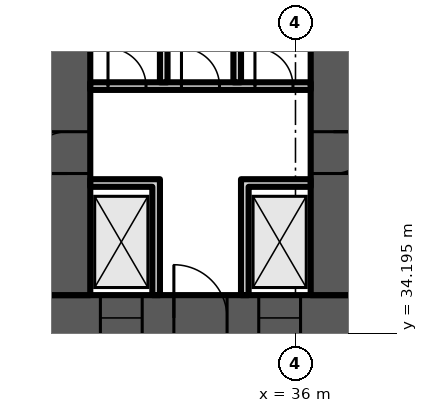
"""IFC4 building model, lengths in metres.
Left out: names, types, materials, properties, quantities, classifications, styles, units other than length and angle.
Written with IfcOpenShell. Run it as: python <this file> out.ifc"""

import sys

from ifc_helpers import new_model, si_unit, direction, frame, frame_2d, origin, place, context, subcontext, project, spatial, polyline, rectangle, outline, extrude, element, fill, save


model = new_model("IFC4")
c1 = context("Model", 3, precision=1e-05, world=origin(), true_north=direction((0.0, 1.0)))
c2 = subcontext(c1, "Body", "Model", "MODEL_VIEW")
j1 = project(units=[si_unit("LENGTHUNIT", "METRE"), si_unit("PLANEANGLEUNIT", "RADIAN")], contexts=[c1])
p1 = place(None, origin())
s1 = spatial("IfcSite", under=j1, at=p1, CompositionType="ELEMENT")
p2 = place(p1, origin())
s2 = spatial("IfcBuilding", under=s1, at=p2, CompositionType="ELEMENT")
p3 = place(p2, frame((0.0, 0.0, 84.7)))
s3 = spatial("IfcBuildingStorey", under=s2, at=p3, CompositionType="ELEMENT", Elevation=84.7)
p4 = place(p3, frame((9.0, 34.6, 0.0), z_axis=(0.0, 0.0, 1.0), x_axis=(1.0, 0.0, 0.0)))
e1 = element("IfcWall", 1, at=p4, inside=s3, PredefinedType="SHEAR", context=c2, shape_type="SweptSolid", body=[
    extrude(rectangle(XDim=56.0, YDim=1.2, at=frame_2d((28.0, 0.0))), origin(), (0.0, 0.0, 1.0), 3.6),
])
p5 = place(p4, frame((3.3, 0.0, 0.0)))
e2 = element("IfcOpeningElement", 2, at=p5, cuts=e1, PredefinedType="OPENING", context=c2, shape_type="SweptSolid", body=[
    extrude(rectangle(XDim=1.0, YDim=2.1, at=frame_2d((0.5, 1.05))), frame((0.0, 0.61, 0.0), z_axis=(0.0, -1.0, 0.0), x_axis=(1.0, 0.0, 0.0)), (0.0, 0.0, 1.0), 1.22),
])
p6 = place(p4, frame((7.867, 0.0, 0.0)))
e3 = element("IfcOpeningElement", 3, at=p6, cuts=e1, PredefinedType="OPENING", context=c2, shape_type="SweptSolid", body=[
    extrude(rectangle(XDim=1.1, YDim=2.1, at=frame_2d((0.55, 1.05))), frame((0.0, 0.61, 0.0), z_axis=(0.0, -1.0, 0.0), x_axis=(1.0, 0.0, 0.0)), (0.0, 0.0, 1.0), 1.22),
])
p7 = place(p4, frame((12.033, 0.0, 0.0)))
e4 = element("IfcOpeningElement", 4, at=p7, cuts=e1, PredefinedType="OPENING", context=c2, shape_type="SweptSolid", body=[
    extrude(rectangle(XDim=1.1, YDim=2.1, at=frame_2d((0.55, 1.05))), frame((0.0, 0.61, 0.0), z_axis=(0.0, -1.0, 0.0), x_axis=(1.0, 0.0, 0.0)), (0.0, 0.0, 1.0), 1.22),
])
p8 = place(p4, frame((9.8, 0.0, 0.0)))
e5 = element("IfcOpeningElement", 5, at=p8, cuts=e1, PredefinedType="OPENING", context=c2, shape_type="SweptSolid", body=[
    extrude(rectangle(XDim=1.4, YDim=2.1, at=frame_2d((0.7, 1.05))), frame((0.0, 0.61, 0.0), z_axis=(0.0, -1.0, 0.0), x_axis=(1.0, 0.0, 0.0)), (0.0, 0.0, 1.0), 1.22),
])
p9 = place(p4, frame((14.65, 0.0, 0.0)))
e6 = element("IfcOpeningElement", 6, at=p9, cuts=e1, PredefinedType="OPENING", context=c2, shape_type="SweptSolid", body=[
    extrude(rectangle(XDim=1.2, YDim=2.1, at=frame_2d((0.6, 1.05))), frame((0.0, 0.61, 0.0), z_axis=(0.0, -1.0, 0.0), x_axis=(1.0, 0.0, 0.0)), (0.0, 0.0, 1.0), 1.22),
])
p10 = place(p4, frame((21.867, 0.0, 0.0)))
e7 = element("IfcOpeningElement", 7, at=p10, cuts=e1, PredefinedType="OPENING", context=c2, shape_type="SweptSolid", body=[
    extrude(rectangle(XDim=1.1, YDim=2.1, at=frame_2d((0.55, 1.05))), frame((0.0, 0.61, 0.0), z_axis=(0.0, -1.0, 0.0), x_axis=(1.0, 0.0, 0.0)), (0.0, 0.0, 1.0), 1.22),
])
p11 = place(p4, frame((26.033, 0.0, 0.0)))
e8 = element("IfcOpeningElement", 8, at=p11, cuts=e1, PredefinedType="OPENING", context=c2, shape_type="SweptSolid", body=[
    extrude(rectangle(XDim=1.1, YDim=2.1, at=frame_2d((0.55, 1.05))), frame((0.0, 0.61, 0.0), z_axis=(0.0, -1.0, 0.0), x_axis=(1.0, 0.0, 0.0)), (0.0, 0.0, 1.0), 1.22),
])
p12 = place(p4, frame((23.8, 0.0, 0.0)))
e9 = element("IfcOpeningElement", 9, at=p12, cuts=e1, PredefinedType="OPENING", context=c2, shape_type="SweptSolid", body=[
    extrude(rectangle(XDim=1.4, YDim=2.1, at=frame_2d((0.7, 1.05))), frame((0.0, 0.61, 0.0), z_axis=(0.0, -1.0, 0.0), x_axis=(1.0, 0.0, 0.0)), (0.0, 0.0, 1.0), 1.22),
])
p13 = place(p4, frame((28.867, 0.0, 0.0)))
e10 = element("IfcOpeningElement", 10, at=p13, cuts=e1, PredefinedType="OPENING", context=c2, shape_type="SweptSolid", body=[
    extrude(rectangle(XDim=1.1, YDim=2.1, at=frame_2d((0.55, 1.05))), frame((0.0, 0.61, 0.0), z_axis=(0.0, -1.0, 0.0), x_axis=(1.0, 0.0, 0.0)), (0.0, 0.0, 1.0), 1.22),
])
p14 = place(p4, frame((33.033, 0.0, 0.0)))
e11 = element("IfcOpeningElement", 11, at=p14, cuts=e1, PredefinedType="OPENING", context=c2, shape_type="SweptSolid", body=[
    extrude(rectangle(XDim=1.1, YDim=2.1, at=frame_2d((0.55, 1.05))), frame((0.0, 0.61, 0.0), z_axis=(0.0, -1.0, 0.0), x_axis=(1.0, 0.0, 0.0)), (0.0, 0.0, 1.0), 1.22),
])
p15 = place(p4, frame((40.15, 0.0, 0.0)))
e12 = element("IfcOpeningElement", 12, at=p15, cuts=e1, PredefinedType="OPENING", context=c2, shape_type="SweptSolid", body=[
    extrude(rectangle(XDim=1.2, YDim=2.1, at=frame_2d((0.6, 1.05))), frame((0.0, 0.61, 0.0), z_axis=(0.0, -1.0, 0.0), x_axis=(1.0, 0.0, 0.0)), (0.0, 0.0, 1.0), 1.22),
])
p16 = place(p4, frame((44.8, 0.0, 0.0)))
e13 = element("IfcOpeningElement", 13, at=p16, cuts=e1, PredefinedType="OPENING", context=c2, shape_type="SweptSolid", body=[
    extrude(rectangle(XDim=1.4, YDim=2.1, at=frame_2d((0.7, 1.05))), frame((0.0, 0.61, 0.0), z_axis=(0.0, -1.0, 0.0), x_axis=(1.0, 0.0, 0.0)), (0.0, 0.0, 1.0), 1.22),
])
p17 = place(p4, frame((49.867, 0.0, 0.0)))
e14 = element("IfcOpeningElement", 14, at=p17, cuts=e1, PredefinedType="OPENING", context=c2, shape_type="SweptSolid", body=[
    extrude(rectangle(XDim=1.1, YDim=2.1, at=frame_2d((0.55, 1.05))), frame((0.0, 0.61, 0.0), z_axis=(0.0, -1.0, 0.0), x_axis=(1.0, 0.0, 0.0)), (0.0, 0.0, 1.0), 1.22),
])
p18 = place(p4, frame((53.5, 0.0, 0.0)))
e15 = element("IfcOpeningElement", 15, at=p18, cuts=e1, PredefinedType="OPENING", context=c2, shape_type="SweptSolid", body=[
    extrude(rectangle(XDim=1.1, YDim=2.1, at=frame_2d((0.55, 1.05))), frame((0.0, 0.61, 0.0), z_axis=(0.0, -1.0, 0.0), x_axis=(1.0, 0.0, 0.0)), (0.0, 0.0, 1.0), 1.22),
])
p19 = place(p4, frame((51.567, 0.0, 0.0)))
e16 = element("IfcOpeningElement", 16, at=p19, cuts=e1, PredefinedType="OPENING", context=c2, shape_type="SweptSolid", body=[
    extrude(rectangle(XDim=1.4, YDim=2.1, at=frame_2d((0.7, 1.05))), frame((0.0, 0.61, 0.0), z_axis=(0.0, -1.0, 0.0), x_axis=(1.0, 0.0, 0.0)), (0.0, 0.0, 1.0), 1.22),
])
p20 = place(p3, frame((30.0, 35.2, 0.0), z_axis=(0.0, 0.0, 1.0), x_axis=(0.0, 1.0, 0.0)))
e17 = element("IfcWall", 17, at=p20, inside=s3, PredefinedType="SHEAR", context=c2, shape_type="SweptSolid", body=[
    extrude(rectangle(XDim=14.168, YDim=1.2, at=frame_2d((7.084, 0.0))), origin(), (0.0, 0.0, 1.0), 3.6),
])
p21 = place(p20, frame((3.2, 0.0, 0.0)))
e18 = element("IfcOpeningElement", 18, at=p21, cuts=e17, PredefinedType="OPENING", context=c2, shape_type="SweptSolid", body=[
    extrude(rectangle(XDim=1.1, YDim=2.1, at=frame_2d((0.55, 1.05))), frame((0.0, 0.61, 0.0), z_axis=(0.0, -1.0, 0.0), x_axis=(1.0, 0.0, 0.0)), (0.0, 0.0, 1.0), 1.22),
])
p22 = place(p3, frame((37.0, 35.2, 0.0), z_axis=(0.0, 0.0, 1.0), x_axis=(0.0, 1.0, 0.0)))
e19 = element("IfcWall", 19, at=p22, inside=s3, PredefinedType="SHEAR", context=c2, shape_type="SweptSolid", body=[
    extrude(rectangle(XDim=14.78, YDim=1.2, at=frame_2d((7.39, 0.0))), origin(), (0.0, 0.0, 1.0), 3.6),
])
p23 = place(p22, frame((3.2, 0.0, 0.0)))
e20 = element("IfcOpeningElement", 20, at=p23, cuts=e19, PredefinedType="OPENING", context=c2, shape_type="SweptSolid", body=[
    extrude(rectangle(XDim=1.1, YDim=2.1, at=frame_2d((0.55, 1.05))), frame((0.0, 0.61, 0.0), z_axis=(0.0, -1.0, 0.0), x_axis=(1.0, 0.0, 0.0)), (0.0, 0.0, 1.0), 1.22),
])
p24 = place(p22, frame((9.6, 0.0, 0.0)))
e21 = element("IfcOpeningElement", 21, at=p24, cuts=e19, PredefinedType="OPENING", context=c2, shape_type="SweptSolid", body=[
    extrude(rectangle(XDim=1.0, YDim=2.1, at=frame_2d((0.5, 1.05))), frame((0.0, 0.61, 0.0), z_axis=(0.0, -1.0, 0.0), x_axis=(1.0, 0.0, 0.0)), (0.0, 0.0, 1.0), 1.22),
])
p25 = place(p3, frame((30.6, 40.7, 0.0), z_axis=(0.0, 0.0, 1.0), x_axis=(1.0, 0.0, 0.0)))
e22 = element("IfcWall", 22, at=p25, inside=s3, PredefinedType="PARTITIONING", context=c2, shape_type="SweptSolid", body=[
    extrude(rectangle(XDim=5.8, YDim=0.2, at=frame_2d((2.9, 0.0))), origin(), (0.0, 0.0, 1.0), 3.2),
])
p26 = place(p25, frame((0.467, 0.0, 0.0)))
e23 = element("IfcOpeningElement", 23, at=p26, cuts=e22, PredefinedType="OPENING", context=c2, shape_type="SweptSolid", body=[
    extrude(rectangle(XDim=1.0, YDim=2.1, at=frame_2d((0.5, 1.05))), frame((0.0, 0.11, 0.0), z_axis=(0.0, -1.0, 0.0), x_axis=(1.0, 0.0, 0.0)), (0.0, 0.0, 1.0), 0.22),
])
p27 = place(p25, frame((2.4, 0.0, 0.0)))
e24 = element("IfcOpeningElement", 24, at=p27, cuts=e22, PredefinedType="OPENING", context=c2, shape_type="SweptSolid", body=[
    extrude(rectangle(XDim=1.0, YDim=2.1, at=frame_2d((0.5, 1.05))), frame((0.0, 0.11, 0.0), z_axis=(0.0, -1.0, 0.0), x_axis=(1.0, 0.0, 0.0)), (0.0, 0.0, 1.0), 0.22),
])
p28 = place(p25, frame((4.333, 0.0, 0.0)))
e25 = element("IfcOpeningElement", 25, at=p28, cuts=e22, PredefinedType="OPENING", context=c2, shape_type="SweptSolid", body=[
    extrude(rectangle(XDim=1.0, YDim=2.1, at=frame_2d((0.5, 1.05))), frame((0.0, 0.11, 0.0), z_axis=(0.0, -1.0, 0.0), x_axis=(1.0, 0.0, 0.0)), (0.0, 0.0, 1.0), 0.22),
])
p29 = place(p3, frame((0.0, 0.0, -0.0)))
e26 = element("IfcWall", 26, at=p29, inside=s3, PredefinedType="PARTITIONING", context=c2, shape_type="SweptSolid", body=[
    extrude(outline(polyline([(32.233, 38.05), (30.6, 38.05), (30.6, 38.25), (32.233, 38.25), (32.433, 38.25), (32.433, 35.2), (32.233, 35.2), (32.233, 38.05)])), origin(), (0.0, 0.0, 1.0), 3.2),
])
p30 = place(p3, frame((0.0, 0.0, -0.0)))
e27 = element("IfcWall", 27, at=p30, inside=s3, PredefinedType="PARTITIONING", context=c2, shape_type="SweptSolid", body=[
    extrude(outline(polyline([(34.567, 38.25), (34.767, 38.25), (36.4, 38.25), (36.4, 38.05), (34.767, 38.05), (34.767, 35.2), (34.567, 35.2), (34.567, 38.25)])), origin(), (0.0, 0.0, 1.0), 3.2),
])
for number, where, z_axis, x_axis in (
    (28, (32.533, 40.8, 0.0), (0.0, 0.0, 1.0), (0.0, 1.0, 0.0)),
    (29, (34.467, 40.8, 0.0), (0.0, 0.0, 1.0), (0.0, 1.0, 0.0)),
):
    element("IfcWall", number, at=place(p3, frame(where, z_axis=z_axis, x_axis=x_axis)), inside=s3, PredefinedType="PARTITIONING", context=c2, shape_type="SweptSolid", body=[
        extrude(rectangle(XDim=8.653, YDim=0.2, at=frame_2d((4.326, 0.0))), origin(), (0.0, 0.0, 1.0), 3.2),
    ])
p31 = place(p10, origin())
e30 = element("IfcDoor", 30, at=p31, inside=s3, OperationType="DOUBLE_DOOR_SLIDING", PredefinedType="DOOR", context=c2, shape_type="SweptSolid", body=[
    extrude(rectangle(XDim=1.1, YDim=2.1, at=frame_2d((0.55, 1.05))), frame((0.0, 0.025, 0.0), z_axis=(0.0, -1.0, 0.0), x_axis=(1.0, 0.0, 0.0)), (0.0, 0.0, 1.0), 0.05),
])
fill(e7, e30)
p32 = place(p11, origin())
e31 = element("IfcDoor", 31, at=p32, inside=s3, OperationType="DOUBLE_DOOR_SLIDING", PredefinedType="DOOR", context=c2, shape_type="SweptSolid", body=[
    extrude(rectangle(XDim=1.1, YDim=2.1, at=frame_2d((0.55, 1.05))), frame((0.0, 0.025, 0.0), z_axis=(0.0, -1.0, 0.0), x_axis=(1.0, 0.0, 0.0)), (0.0, 0.0, 1.0), 0.05),
])
fill(e8, e31)
p33 = place(p12, origin())
e32 = element("IfcDoor", 32, at=p33, inside=s3, OperationType="DOUBLE_DOOR_SINGLE_SWING", PredefinedType="DOOR", context=c2, shape_type="SweptSolid", body=[
    extrude(rectangle(XDim=1.4, YDim=2.1, at=frame_2d((0.7, 1.05))), frame((0.0, 0.025, 0.0), z_axis=(0.0, -1.0, 0.0), x_axis=(1.0, 0.0, 0.0)), (0.0, 0.0, 1.0), 0.05),
])
fill(e9, e32)
p34 = place(p26, origin())
e33 = element("IfcDoor", 33, at=p34, inside=s3, OperationType="SINGLE_SWING_LEFT", PredefinedType="DOOR", context=c2, shape_type="SweptSolid", body=[
    extrude(rectangle(XDim=1.0, YDim=2.1, at=frame_2d((0.5, 1.05))), frame((0.0, 0.025, 0.0), z_axis=(0.0, -1.0, 0.0), x_axis=(1.0, 0.0, 0.0)), (0.0, 0.0, 1.0), 0.05),
])
fill(e23, e33)
p35 = place(p27, origin())
e34 = element("IfcDoor", 34, at=p35, inside=s3, OperationType="SINGLE_SWING_LEFT", PredefinedType="DOOR", context=c2, shape_type="SweptSolid", body=[
    extrude(rectangle(XDim=1.0, YDim=2.1, at=frame_2d((0.5, 1.05))), frame((0.0, 0.025, 0.0), z_axis=(0.0, -1.0, 0.0), x_axis=(1.0, 0.0, 0.0)), (0.0, 0.0, 1.0), 0.05),
])
fill(e24, e34)
p36 = place(p28, origin())
e35 = element("IfcDoor", 35, at=p36, inside=s3, OperationType="SINGLE_SWING_LEFT", PredefinedType="DOOR", context=c2, shape_type="SweptSolid", body=[
    extrude(rectangle(XDim=1.0, YDim=2.1, at=frame_2d((0.5, 1.05))), frame((0.0, 0.025, 0.0), z_axis=(0.0, -1.0, 0.0), x_axis=(1.0, 0.0, 0.0)), (0.0, 0.0, 1.0), 0.05),
])
fill(e25, e35)
p37 = place(p21, origin())
e36 = element("IfcDoor", 36, at=p37, inside=s3, OperationType="SINGLE_SWING_LEFT", PredefinedType="DOOR", context=c2, shape_type="SweptSolid", body=[
    extrude(rectangle(XDim=1.1, YDim=2.1, at=frame_2d((0.55, 1.05))), frame((0.0, 0.025, 0.0), z_axis=(0.0, -1.0, 0.0), x_axis=(1.0, 0.0, 0.0)), (0.0, 0.0, 1.0), 0.05),
])
fill(e18, e36)
p38 = place(p23, origin())
e37 = element("IfcDoor", 37, at=p38, inside=s3, OperationType="SINGLE_SWING_RIGHT", PredefinedType="DOOR", context=c2, shape_type="SweptSolid", body=[
    extrude(rectangle(XDim=1.1, YDim=2.1, at=frame_2d((0.55, 1.05))), frame((0.0, 0.025, 0.0), z_axis=(0.0, -1.0, 0.0), x_axis=(1.0, 0.0, 0.0)), (0.0, 0.0, 1.0), 0.05),
])
fill(e20, e37)
save(model, sys.argv[1])
